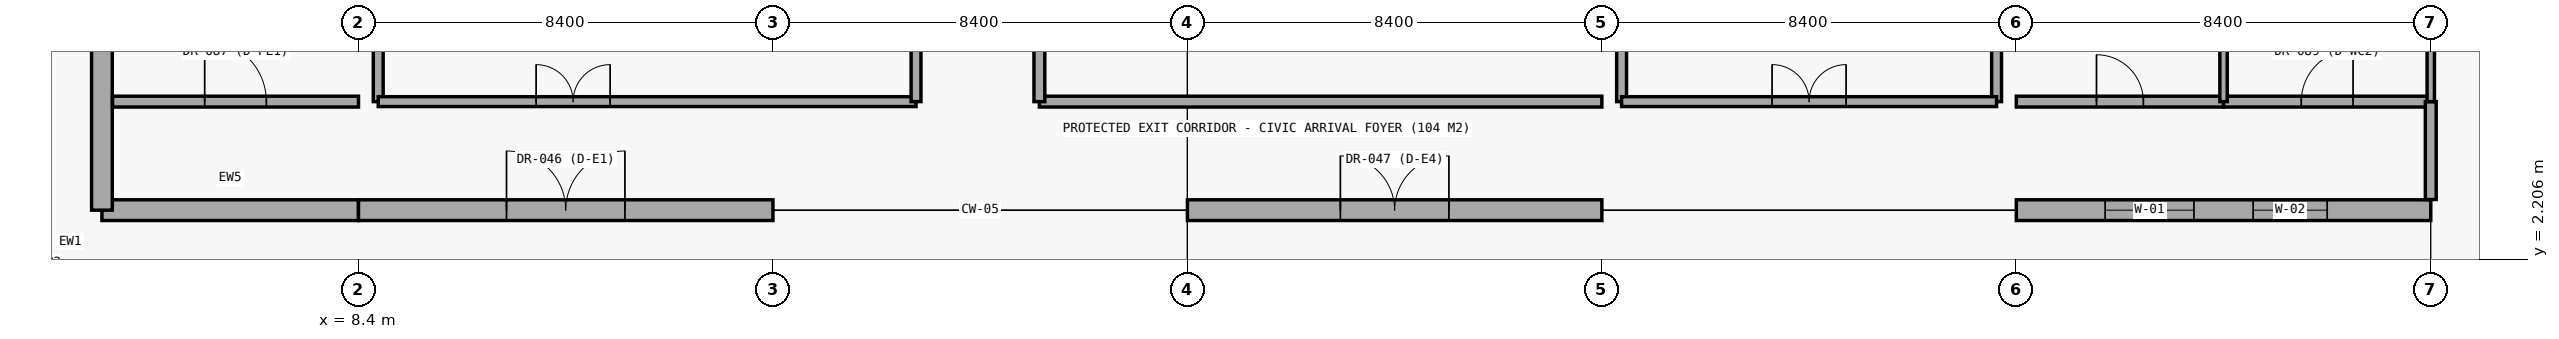
"""IFC4 building model, lengths in metres.
Left out: names, types, materials, properties, quantities, classifications, styles, units other than length and angle.
Written with IfcOpenShell. Run it as: python <this file> out.ifc"""

import sys

from ifc_helpers import new_model, si_unit, direction, frame, frame_2d, origin, place, context, subcontext, project, spatial, rectangle, extrude, element, fill, save


model = new_model("IFC4")
c1 = context("Model", 3, precision=1e-05, world=origin(), true_north=direction((0.0, 1.0)))
c2 = subcontext(c1, "Body", "Model", "MODEL_VIEW")
j1 = project(units=[si_unit("LENGTHUNIT", "METRE"), si_unit("PLANEANGLEUNIT", "RADIAN")], contexts=[c1])
p1 = place(None, origin())
s1 = spatial("IfcSite", under=j1, at=p1, CompositionType="ELEMENT")
p2 = place(p1, origin())
s2 = spatial("IfcBuilding", under=s1, at=p2, CompositionType="ELEMENT")
p3 = place(p2, origin())
s3 = spatial("IfcBuildingStorey", under=s2, at=p3, CompositionType="ELEMENT", Elevation=0.0)
p4 = place(p3, frame((3.2, 3.2, 0.0), z_axis=(0.0, 0.0, 1.0), x_axis=(1.0, 0.0, 0.0)))
e1 = element("IfcWall", 1, at=p4, inside=s3, PredefinedType="STANDARD", context=c2, shape_type="SweptSolid", body=[
    extrude(rectangle(XDim=5.2, YDim=0.42, at=frame_2d((2.6, 0.0))), origin(), (0.0, 0.0, 1.0), 4.18),
])
p5 = place(p3, frame((8.4, 3.2, 0.0), z_axis=(0.0, 0.0, 1.0), x_axis=(1.0, 0.0, 0.0)))
e2 = element("IfcWall", 2, at=p5, inside=s3, PredefinedType="STANDARD", context=c2, shape_type="SweptSolid", body=[
    extrude(rectangle(XDim=8.4, YDim=0.42, at=frame_2d((4.2, 0.0))), origin(), (0.0, 0.0, 1.0), 4.18),
])
p6 = place(p5, frame((3.0, 0.0, 0.0)))
e3 = element("IfcOpeningElement", 3, at=p6, cuts=e2, PredefinedType="OPENING", context=c2, shape_type="SweptSolid", body=[
    extrude(rectangle(XDim=2.4, YDim=2.6, at=frame_2d((1.2, 1.3))), frame((0.0, 0.22, 0.0), z_axis=(0.0, -1.0, 0.0), x_axis=(1.0, 0.0, 0.0)), (0.0, 0.0, 1.0), 0.44),
])
p7 = place(p3, frame((25.2, 3.2, 0.0), z_axis=(0.0, 0.0, 1.0), x_axis=(1.0, 0.0, 0.0)))
e4 = element("IfcWall", 4, at=p7, inside=s3, PredefinedType="STANDARD", context=c2, shape_type="SweptSolid", body=[
    extrude(rectangle(XDim=8.4, YDim=0.42, at=frame_2d((4.2, 0.0))), origin(), (0.0, 0.0, 1.0), 4.18),
])
p8 = place(p7, frame((3.1, 0.0, 0.0)))
e5 = element("IfcOpeningElement", 5, at=p8, cuts=e4, PredefinedType="OPENING", context=c2, shape_type="SweptSolid", body=[
    extrude(rectangle(XDim=2.2, YDim=2.5, at=frame_2d((1.1, 1.25))), frame((0.0, 0.22, 0.0), z_axis=(0.0, -1.0, 0.0), x_axis=(1.0, 0.0, 0.0)), (0.0, 0.0, 1.0), 0.44),
])
p9 = place(p3, frame((42.0, 3.2, 0.0), z_axis=(0.0, 0.0, 1.0), x_axis=(1.0, 0.0, 0.0)))
e6 = element("IfcWall", 6, at=p9, inside=s3, PredefinedType="STANDARD", context=c2, shape_type="SweptSolid", body=[
    extrude(rectangle(XDim=8.4, YDim=0.42, at=frame_2d((4.2, 0.0))), origin(), (0.0, 0.0, 1.0), 4.18),
])
p10 = place(p9, frame((1.8, 0.0, 0.9)))
e7 = element("IfcOpeningElement", 7, at=p10, cuts=e6, PredefinedType="OPENING", context=c2, shape_type="SweptSolid", body=[
    extrude(rectangle(XDim=1.8, YDim=2.8, at=frame_2d((0.9, 1.4))), frame((0.0, 0.22, 0.0), z_axis=(0.0, -1.0, 0.0), x_axis=(1.0, 0.0, 0.0)), (0.0, 0.0, 1.0), 0.44),
])
p11 = place(p9, frame((4.8, 0.0, 0.9)))
e8 = element("IfcOpeningElement", 8, at=p11, cuts=e6, PredefinedType="OPENING", context=c2, shape_type="SweptSolid", body=[
    extrude(rectangle(XDim=1.5, YDim=2.8, at=frame_2d((0.75, 1.4))), frame((0.0, 0.22, 0.0), z_axis=(0.0, -1.0, 0.0), x_axis=(1.0, 0.0, 0.0)), (0.0, 0.0, 1.0), 0.44),
])
p12 = place(p3, frame((3.2, 8.4, 0.0), z_axis=(0.0, 0.0, 1.0), x_axis=(0.0, -1.0, 0.0)))
e9 = element("IfcWall", 9, at=p12, inside=s3, PredefinedType="STANDARD", context=c2, shape_type="SweptSolid", body=[
    extrude(rectangle(XDim=5.2, YDim=0.42, at=frame_2d((2.6, 0.0))), origin(), (0.0, 0.0, 1.0), 4.18),
])
p13 = place(p3, frame((0.0, 4.2, 0.0), z_axis=(0.0, 0.0, 1.0), x_axis=(0.707106781187, -0.707106781187, 0.0)))
e10 = element("IfcWall", 10, at=p13, inside=s3, PredefinedType="STANDARD", context=c2, shape_type="SweptSolid", body=[
    extrude(rectangle(XDim=5.94, YDim=0.36, at=frame_2d((2.97, 0.0))), origin(), (0.0, 0.0, 1.0), 4.22),
])
p14 = place(p13, frame((2.5, 0.0, 1.0)))
e11 = element("IfcOpeningElement", 11, at=p14, cuts=e10, PredefinedType="OPENING", context=c2, shape_type="SweptSolid", body=[
    extrude(rectangle(XDim=0.85, YDim=1.8, at=frame_2d((0.425, 0.9))), frame((0.0, 0.19, 0.0), z_axis=(0.0, -1.0, 0.0), x_axis=(1.0, 0.0, 0.0)), (0.0, 0.0, 1.0), 0.38),
])
p15 = place(p3, frame((8.8, 5.4, 0.0), z_axis=(0.0, 0.0, 1.0), x_axis=(0.0, 1.0, 0.0)))
e12 = element("IfcWall", 12, at=p15, inside=s3, PredefinedType="PARTITIONING", context=c2, shape_type="SweptSolid", body=[
    extrude(rectangle(XDim=2.85, YDim=0.2, at=frame_2d((1.425, 0.0))), origin(), (0.0, 0.0, 1.0), 4.12),
])
p16 = place(p3, frame((8.8, 5.4, 0.0), z_axis=(0.0, 0.0, 1.0), x_axis=(1.0, 0.0, 0.0)))
e13 = element("IfcWall", 13, at=p16, inside=s3, PredefinedType="PARTITIONING", context=c2, shape_type="SweptSolid", body=[
    extrude(rectangle(XDim=10.9, YDim=0.2, at=frame_2d((5.45, 0.0))), origin(), (0.0, 0.0, 1.0), 4.12),
])
p17 = place(p16, frame((3.2, 0.0, 0.0)))
e14 = element("IfcOpeningElement", 14, at=p17, cuts=e13, PredefinedType="OPENING", context=c2, shape_type="SweptSolid", body=[
    extrude(rectangle(XDim=1.5, YDim=2.2, at=frame_2d((0.75, 1.1))), frame((0.0, 0.11, 0.0), z_axis=(0.0, -1.0, 0.0), x_axis=(1.0, 0.0, 0.0)), (0.0, 0.0, 1.0), 0.22),
])
p18 = place(p3, frame((19.7, 5.4, 0.0), z_axis=(0.0, 0.0, 1.0), x_axis=(0.0, 1.0, 0.0)))
e15 = element("IfcWall", 15, at=p18, inside=s3, PredefinedType="PARTITIONING", context=c2, shape_type="SweptSolid", body=[
    extrude(rectangle(XDim=9.6, YDim=0.2, at=frame_2d((4.8, 0.0))), origin(), (0.0, 0.0, 1.0), 4.12),
])
for number, where, z_axis, x_axis in (
    (16, (34.0, 5.4, 0.0), (0.0, 0.0, 1.0), (0.0, 1.0, 0.0)),
    (17, (41.6, 5.4, 0.0), (0.0, 0.0, 1.0), (0.0, 1.0, 0.0)),
):
    element("IfcWall", number, at=place(p3, frame(where, z_axis=z_axis, x_axis=x_axis)), inside=s3, PredefinedType="PARTITIONING", context=c2, shape_type="SweptSolid", body=[
        extrude(rectangle(XDim=2.85, YDim=0.2, at=frame_2d((1.425, 0.0))), origin(), (0.0, 0.0, 1.0), 4.09),
    ])
p19 = place(p3, frame((34.0, 5.4, 0.0), z_axis=(0.0, 0.0, 1.0), x_axis=(1.0, 0.0, 0.0)))
e18 = element("IfcWall", 18, at=p19, inside=s3, PredefinedType="PARTITIONING", context=c2, shape_type="SweptSolid", body=[
    extrude(rectangle(XDim=7.6, YDim=0.2, at=frame_2d((3.8, 0.0))), origin(), (0.0, 0.0, 1.0), 4.12),
])
p20 = place(p19, frame((3.05, 0.0, 0.0)))
e19 = element("IfcOpeningElement", 19, at=p20, cuts=e18, PredefinedType="OPENING", context=c2, shape_type="SweptSolid", body=[
    extrude(rectangle(XDim=1.5, YDim=2.2, at=frame_2d((0.75, 1.1))), frame((0.0, 0.11, 0.0), z_axis=(0.0, -1.0, 0.0), x_axis=(1.0, 0.0, 0.0)), (0.0, 0.0, 1.0), 0.22),
])
p21 = place(p3, frame((3.415, 5.4, 0.0), z_axis=(0.0, 0.0, 1.0), x_axis=(1.0, 0.0, 0.0)))
e20 = element("IfcWall", 20, at=p21, inside=s3, PredefinedType="PARTITIONING", context=c2, shape_type="SweptSolid", body=[
    extrude(rectangle(XDim=4.985, YDim=0.22, at=frame_2d((2.492, 0.0))), origin(), (0.0, 0.0, 1.0), 4.1),
])
p22 = place(p21, frame((1.868, 0.0, 0.0)))
e21 = element("IfcOpeningElement", 21, at=p22, cuts=e20, PredefinedType="OPENING", context=c2, shape_type="SweptSolid", body=[
    extrude(rectangle(XDim=1.25, YDim=2.2, at=frame_2d((0.625, 1.1))), frame((0.0, 0.12, 0.0), z_axis=(0.0, -1.0, 0.0), x_axis=(1.0, 0.0, 0.0)), (0.0, 0.0, 1.0), 0.24),
])
p23 = place(p3, frame((22.2, 5.4, 0.0), z_axis=(0.0, 0.0, 1.0), x_axis=(1.0, 0.0, 0.0)))
e22 = element("IfcWall", 22, at=p23, inside=s3, PredefinedType="PARTITIONING", context=c2, shape_type="SweptSolid", body=[
    extrude(rectangle(XDim=11.4, YDim=0.22, at=frame_2d((5.7, 0.0))), origin(), (0.0, 0.0, 1.0), 4.1),
])
p24 = place(p3, frame((42.0, 5.4, 0.0), z_axis=(0.0, 0.0, 1.0), x_axis=(1.0, 0.0, 0.0)))
e23 = element("IfcWall", 23, at=p24, inside=s3, PredefinedType="PARTITIONING", context=c2, shape_type="SweptSolid", body=[
    extrude(rectangle(XDim=4.2, YDim=0.22, at=frame_2d((2.1, 0.0))), origin(), (0.0, 0.0, 1.0), 4.1),
])
p25 = place(p24, frame((1.625, 0.0, 0.0)))
e24 = element("IfcOpeningElement", 24, at=p25, cuts=e23, PredefinedType="OPENING", context=c2, shape_type="SweptSolid", body=[
    extrude(rectangle(XDim=0.95, YDim=2.1, at=frame_2d((0.475, 1.05))), frame((0.0, 0.12, 0.0), z_axis=(0.0, -1.0, 0.0), x_axis=(1.0, 0.0, 0.0)), (0.0, 0.0, 1.0), 0.24),
])
p26 = place(p3, frame((46.2, 5.4, 0.0), z_axis=(0.0, 0.0, 1.0), x_axis=(1.0, 0.0, 0.0)))
e25 = element("IfcWall", 25, at=p26, inside=s3, PredefinedType="PARTITIONING", context=c2, shape_type="SweptSolid", body=[
    extrude(rectangle(XDim=4.2, YDim=0.22, at=frame_2d((2.1, 0.0))), origin(), (0.0, 0.0, 1.0), 4.1),
])
p27 = place(p26, frame((1.575, 0.0, 0.0)))
e26 = element("IfcOpeningElement", 26, at=p27, cuts=e25, PredefinedType="OPENING", context=c2, shape_type="SweptSolid", body=[
    extrude(rectangle(XDim=1.05, YDim=2.15, at=frame_2d((0.525, 1.075))), frame((0.0, 0.12, 0.0), z_axis=(0.0, -1.0, 0.0), x_axis=(1.0, 0.0, 0.0)), (0.0, 0.0, 1.0), 0.24),
])
p28 = place(p3, frame((22.2, 5.4, 0.0), z_axis=(0.0, 0.0, 1.0), x_axis=(0.0, 1.0, 0.0)))
e27 = element("IfcWall", 27, at=p28, inside=s3, PredefinedType="PARTITIONING", context=c2, shape_type="SweptSolid", body=[
    extrude(rectangle(XDim=16.6, YDim=0.22, at=frame_2d((8.3, 0.0))), origin(), (0.0, 0.0, 1.0), 4.1),
])
p29 = place(p28, frame((13.12, 0.0, 0.0)))
e28 = element("IfcOpeningElement", 28, at=p29, cuts=e27, PredefinedType="OPENING", context=c2, shape_type="SweptSolid", body=[
    extrude(rectangle(XDim=1.0, YDim=2.15, at=frame_2d((0.5, 1.075))), frame((0.0, 0.12, 0.0), z_axis=(0.0, -1.0, 0.0), x_axis=(1.0, 0.0, 0.0)), (0.0, 0.0, 1.0), 0.24),
])
p30 = place(p3, frame((46.2, 5.4, 0.0), z_axis=(0.0, 0.0, 1.0), x_axis=(0.0, 1.0, 0.0)))
e29 = element("IfcWall", 29, at=p30, inside=s3, PredefinedType="PARTITIONING", context=c2, shape_type="SweptSolid", body=[
    extrude(rectangle(XDim=5.6, YDim=0.15, at=frame_2d((2.8, 0.0))), origin(), (0.0, 0.0, 1.0), 4.1),
])
p31 = place(p3, frame((50.4, 3.415, 0.0), z_axis=(0.0, 0.0, 1.0), x_axis=(0.0, 1.0, 0.0)))
e30 = element("IfcWall", 30, at=p31, inside=s3, PredefinedType="PARTITIONING", context=c2, shape_type="SweptSolid", body=[
    extrude(rectangle(XDim=1.985, YDim=0.22, at=frame_2d((0.992, 0.0))), origin(), (0.0, 0.0, 1.0), 4.1),
])
p32 = place(p3, frame((50.4, 5.4, 0.0), z_axis=(0.0, 0.0, 1.0), x_axis=(0.0, 1.0, 0.0)))
e31 = element("IfcWall", 31, at=p32, inside=s3, PredefinedType="PARTITIONING", context=c2, shape_type="SweptSolid", body=[
    extrude(rectangle(XDim=5.6, YDim=0.15, at=frame_2d((2.8, 0.0))), origin(), (0.0, 0.0, 1.0), 4.1),
])
p33 = place(p6, origin())
e32 = element("IfcDoor", 32, at=p33, inside=s3, OperationType="DOUBLE_DOOR_SINGLE_SWING", PredefinedType="DOOR", context=c2, shape_type="SweptSolid", body=[
    extrude(rectangle(XDim=2.4, YDim=2.6, at=frame_2d((1.2, 1.3))), frame((0.0, 0.025, 0.0), z_axis=(0.0, -1.0, 0.0), x_axis=(1.0, 0.0, 0.0)), (0.0, 0.0, 1.0), 0.05),
])
fill(e3, e32)
p34 = place(p8, origin())
e33 = element("IfcDoor", 33, at=p34, inside=s3, OperationType="DOUBLE_DOOR_SINGLE_SWING", PredefinedType="DOOR", context=c2, shape_type="SweptSolid", body=[
    extrude(rectangle(XDim=2.2, YDim=2.5, at=frame_2d((1.1, 1.25))), frame((0.0, 0.025, 0.0), z_axis=(0.0, -1.0, 0.0), x_axis=(1.0, 0.0, 0.0)), (0.0, 0.0, 1.0), 0.05),
])
fill(e5, e33)
p35 = place(p10, origin())
e34 = element("IfcWindow", 34, at=p35, inside=s3, PartitioningType="SINGLE_PANEL", PredefinedType="WINDOW", context=c2, shape_type="SweptSolid", body=[
    extrude(rectangle(XDim=1.8, YDim=2.8, at=frame_2d((0.9, 1.4))), frame((0.0, 0.03, 0.0), z_axis=(0.0, -1.0, 0.0), x_axis=(1.0, 0.0, 0.0)), (0.0, 0.0, 1.0), 0.06),
])
fill(e7, e34)
p36 = place(p11, origin())
e35 = element("IfcWindow", 35, at=p36, inside=s3, PartitioningType="SINGLE_PANEL", PredefinedType="WINDOW", context=c2, shape_type="SweptSolid", body=[
    extrude(rectangle(XDim=1.5, YDim=2.8, at=frame_2d((0.75, 1.4))), frame((0.0, 0.03, 0.0), z_axis=(0.0, -1.0, 0.0), x_axis=(1.0, 0.0, 0.0)), (0.0, 0.0, 1.0), 0.06),
])
fill(e8, e35)
p37 = place(p14, origin())
e36 = element("IfcWindow", 36, at=p37, inside=s3, PartitioningType="SINGLE_PANEL", PredefinedType="WINDOW", context=c2, shape_type="SweptSolid", body=[
    extrude(rectangle(XDim=0.85, YDim=1.8, at=frame_2d((0.425, 0.9))), frame((0.0, 0.03, 0.0), z_axis=(0.0, -1.0, 0.0), x_axis=(1.0, 0.0, 0.0)), (0.0, 0.0, 1.0), 0.06),
])
fill(e11, e36)
p38 = place(p17, origin())
e37 = element("IfcDoor", 37, at=p38, inside=s3, OperationType="DOUBLE_DOOR_SINGLE_SWING", PredefinedType="DOOR", context=c2, shape_type="SweptSolid", body=[
    extrude(rectangle(XDim=1.5, YDim=2.2, at=frame_2d((0.75, 1.1))), frame((0.0, 0.025, 0.0), z_axis=(0.0, -1.0, 0.0), x_axis=(1.0, 0.0, 0.0)), (0.0, 0.0, 1.0), 0.05),
])
fill(e14, e37)
p39 = place(p20, origin())
e38 = element("IfcDoor", 38, at=p39, inside=s3, OperationType="DOUBLE_DOOR_SINGLE_SWING", PredefinedType="DOOR", context=c2, shape_type="SweptSolid", body=[
    extrude(rectangle(XDim=1.5, YDim=2.2, at=frame_2d((0.75, 1.1))), frame((0.0, 0.025, 0.0), z_axis=(0.0, -1.0, 0.0), x_axis=(1.0, 0.0, 0.0)), (0.0, 0.0, 1.0), 0.05),
])
fill(e19, e38)
p40 = place(p22, origin())
e39 = element("IfcDoor", 39, at=p40, inside=s3, OperationType="SINGLE_SWING_LEFT", PredefinedType="DOOR", context=c2, shape_type="SweptSolid", body=[
    extrude(rectangle(XDim=1.25, YDim=2.2, at=frame_2d((0.625, 1.1))), frame((0.0, 0.025, 0.0), z_axis=(0.0, -1.0, 0.0), x_axis=(1.0, 0.0, 0.0)), (0.0, 0.0, 1.0), 0.05),
])
fill(e21, e39)
p41 = place(p25, origin())
e40 = element("IfcDoor", 40, at=p41, inside=s3, OperationType="SINGLE_SWING_LEFT", PredefinedType="DOOR", context=c2, shape_type="SweptSolid", body=[
    extrude(rectangle(XDim=0.95, YDim=2.1, at=frame_2d((0.475, 1.05))), frame((0.0, 0.025, 0.0), z_axis=(0.0, -1.0, 0.0), x_axis=(1.0, 0.0, 0.0)), (0.0, 0.0, 1.0), 0.05),
])
fill(e24, e40)
p42 = place(p27, origin())
e41 = element("IfcDoor", 41, at=p42, inside=s3, OperationType="SINGLE_SWING_RIGHT", PredefinedType="DOOR", context=c2, shape_type="SweptSolid", body=[
    extrude(rectangle(XDim=1.05, YDim=2.15, at=frame_2d((0.525, 1.075))), frame((0.0, 0.025, 0.0), z_axis=(0.0, -1.0, 0.0), x_axis=(1.0, 0.0, 0.0)), (0.0, 0.0, 1.0), 0.05),
])
fill(e26, e41)
save(model, sys.argv[1])
